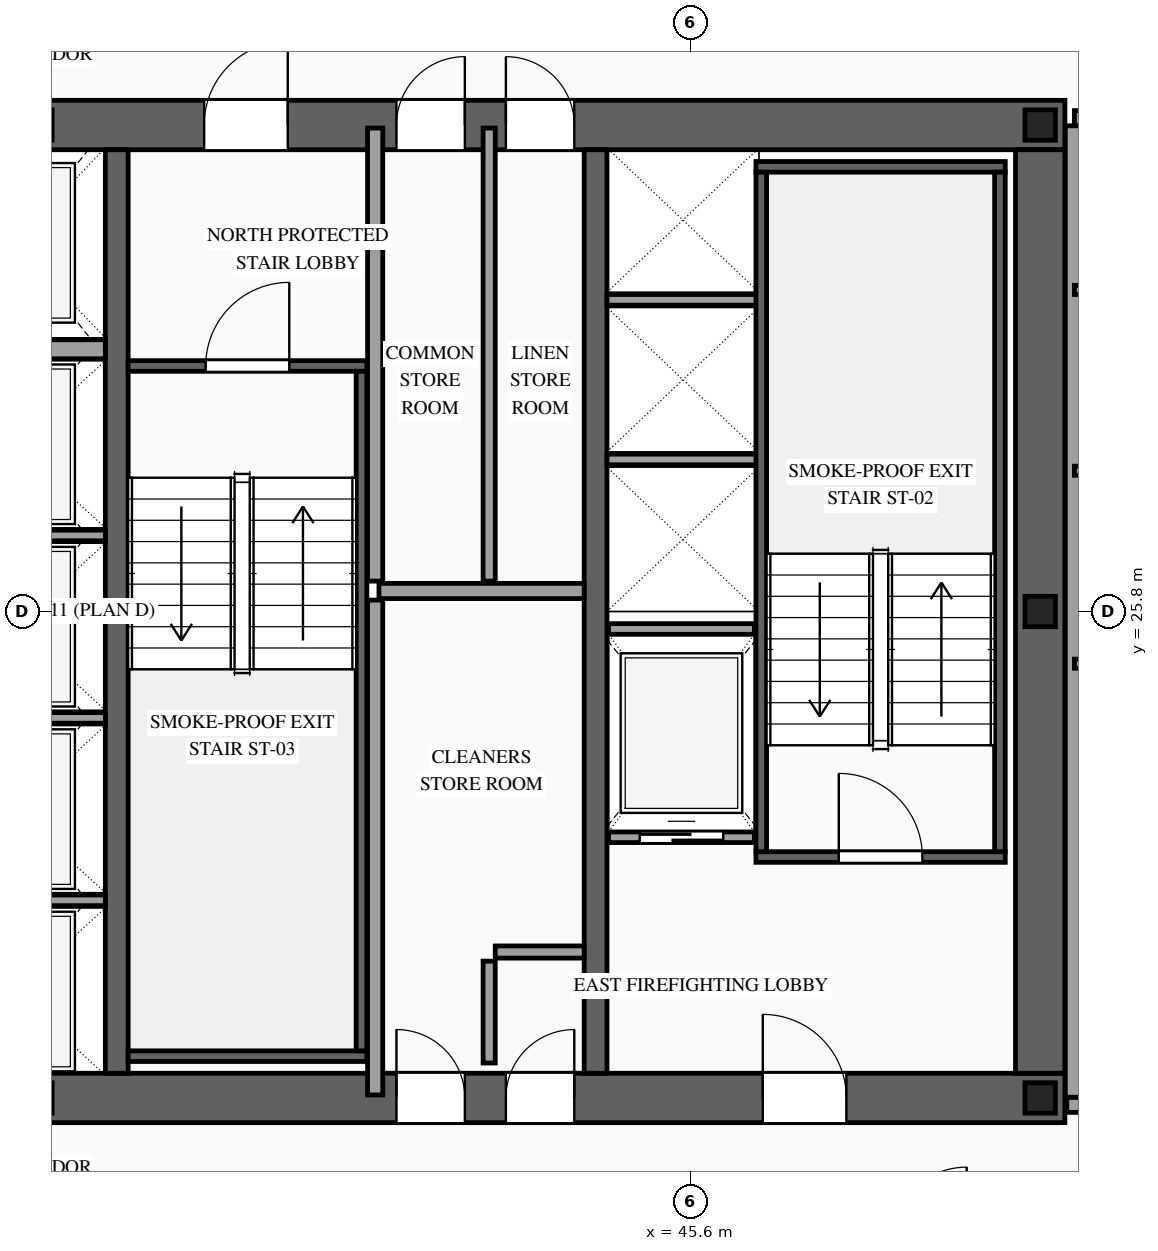
"""IFC4 building model, lengths in metres.
Left out: names, types, materials, properties, quantities, classifications, styles, units other than length and angle.
Written with IfcOpenShell. Run it as: python <this file> out.ifc"""

import sys

from ifc_helpers import new_model, si_unit, direction, frame, frame_2d, origin, origin_2d, place, context, subcontext, project, spatial, rectangle, i_section, extrude, source, transform, mapped, element, fill, save


model = new_model("IFC4")
c1 = context("Model", 3, precision=1e-05, world=origin(), true_north=direction((0.0, 1.0)))
c2 = subcontext(c1, "Body", "Model", "MODEL_VIEW")
j1 = project(units=[si_unit("LENGTHUNIT", "METRE"), si_unit("PLANEANGLEUNIT", "RADIAN")], contexts=[c1])
p1 = place(None, origin())
s1 = spatial("IfcSite", under=j1, at=p1, CompositionType="ELEMENT")
p2 = place(p1, origin())
s2 = spatial("IfcBuilding", under=s1, at=p2, CompositionType="ELEMENT")
p3 = place(p2, frame((0.0, 0.0, 191.5)))
s3 = spatial("IfcBuildingStorey", under=s2, at=p3, CompositionType="ELEMENT", Elevation=191.5)
p4 = place(p3, frame((23.475, 19.4, 0.0), z_axis=(0.0, 0.0, 1.0), x_axis=(1.0, 0.0, 0.0)))
e1 = element("IfcWall", 1, at=p4, inside=s3, PredefinedType="SHEAR", context=c2, shape_type="SweptSolid", body=[
    extrude(rectangle(XDim=27.05, YDim=0.65, at=frame_2d((13.525, 0.0))), origin(), (0.0, 0.0, 1.0), 3.5),
])
p5 = place(p4, frame((1.975, 0.0, 0.0)))
e2 = element("IfcOpeningElement", 2, at=p5, cuts=e1, PredefinedType="OPENING", context=c2, shape_type="SweptSolid", body=[
    extrude(rectangle(XDim=1.1, YDim=2.2, at=frame_2d((0.55, 1.1))), frame((0.0, 0.34, 0.0), z_axis=(0.0, -1.0, 0.0), x_axis=(1.0, 0.0, 0.0)), (0.0, 0.0, 1.0), 0.68),
])
p6 = place(p4, frame((9.875, 0.0, 0.0)))
e3 = element("IfcOpeningElement", 3, at=p6, cuts=e1, PredefinedType="OPENING", context=c2, shape_type="SweptSolid", body=[
    extrude(rectangle(XDim=1.1, YDim=2.2, at=frame_2d((0.55, 1.1))), frame((0.0, 0.34, 0.0), z_axis=(0.0, -1.0, 0.0), x_axis=(1.0, 0.0, 0.0)), (0.0, 0.0, 1.0), 0.68),
])
p7 = place(p4, frame((23.075, 0.0, 0.0)))
e4 = element("IfcOpeningElement", 4, at=p7, cuts=e1, PredefinedType="OPENING", context=c2, shape_type="SweptSolid", body=[
    extrude(rectangle(XDim=1.1, YDim=2.2, at=frame_2d((0.55, 1.1))), frame((0.0, 0.34, 0.0), z_axis=(0.0, -1.0, 0.0), x_axis=(1.0, 0.0, 0.0)), (0.0, 0.0, 1.0), 0.68),
])
p8 = place(p4, frame((19.695, 0.0, 0.0)))
e5 = element("IfcOpeningElement", 5, at=p8, cuts=e1, PredefinedType="OPENING", context=c2, shape_type="SweptSolid", body=[
    extrude(rectangle(XDim=0.9, YDim=2.15, at=frame_2d((0.45, 1.075))), frame((0.0, 0.34, 0.0), z_axis=(0.0, -1.0, 0.0), x_axis=(1.0, 0.0, 0.0)), (0.0, 0.0, 1.0), 0.68),
])
p9 = place(p4, frame((18.255, 0.0, 0.0)))
e6 = element("IfcOpeningElement", 6, at=p9, cuts=e1, PredefinedType="OPENING", context=c2, shape_type="SweptSolid", body=[
    extrude(rectangle(XDim=0.9, YDim=2.15, at=frame_2d((0.45, 1.075))), frame((0.0, 0.34, 0.0), z_axis=(0.0, -1.0, 0.0), x_axis=(1.0, 0.0, 0.0)), (0.0, 0.0, 1.0), 0.68),
])
p10 = place(p3, frame((23.475, 32.2, 0.0), z_axis=(0.0, 0.0, 1.0), x_axis=(1.0, 0.0, 0.0)))
e7 = element("IfcWall", 7, at=p10, inside=s3, PredefinedType="SHEAR", context=c2, shape_type="SweptSolid", body=[
    extrude(rectangle(XDim=27.05, YDim=0.65, at=frame_2d((13.525, 0.0))), origin(), (0.0, 0.0, 1.0), 3.5),
])
p11 = place(p10, frame((4.595, 0.0, 0.0)))
e8 = element("IfcOpeningElement", 8, at=p11, cuts=e7, PredefinedType="OPENING", context=c2, shape_type="SweptSolid", body=[
    extrude(rectangle(XDim=0.9, YDim=2.15, at=frame_2d((0.45, 1.075))), frame((0.0, 0.34, 0.0), z_axis=(0.0, -1.0, 0.0), x_axis=(1.0, 0.0, 0.0)), (0.0, 0.0, 1.0), 0.68),
])
p12 = place(p10, frame((9.875, 0.0, 0.0)))
e9 = element("IfcOpeningElement", 9, at=p12, cuts=e7, PredefinedType="OPENING", context=c2, shape_type="SweptSolid", body=[
    extrude(rectangle(XDim=1.1, YDim=2.2, at=frame_2d((0.55, 1.1))), frame((0.0, 0.34, 0.0), z_axis=(0.0, -1.0, 0.0), x_axis=(1.0, 0.0, 0.0)), (0.0, 0.0, 1.0), 0.68),
])
p13 = place(p10, frame((15.725, 0.0, 0.0)))
e10 = element("IfcOpeningElement", 10, at=p13, cuts=e7, PredefinedType="OPENING", context=c2, shape_type="SweptSolid", body=[
    extrude(rectangle(XDim=1.1, YDim=2.2, at=frame_2d((0.55, 1.1))), frame((0.0, 0.34, 0.0), z_axis=(0.0, -1.0, 0.0), x_axis=(1.0, 0.0, 0.0)), (0.0, 0.0, 1.0), 0.68),
])
p14 = place(p10, frame((18.255, 0.0, 0.0)))
e11 = element("IfcOpeningElement", 11, at=p14, cuts=e7, PredefinedType="OPENING", context=c2, shape_type="SweptSolid", body=[
    extrude(rectangle(XDim=0.9, YDim=2.15, at=frame_2d((0.45, 1.075))), frame((0.0, 0.34, 0.0), z_axis=(0.0, -1.0, 0.0), x_axis=(1.0, 0.0, 0.0)), (0.0, 0.0, 1.0), 0.68),
])
p15 = place(p10, frame((19.695, 0.0, 0.0)))
e12 = element("IfcOpeningElement", 12, at=p15, cuts=e7, PredefinedType="OPENING", context=c2, shape_type="SweptSolid", body=[
    extrude(rectangle(XDim=0.9, YDim=2.15, at=frame_2d((0.45, 1.075))), frame((0.0, 0.34, 0.0), z_axis=(0.0, -1.0, 0.0), x_axis=(1.0, 0.0, 0.0)), (0.0, 0.0, 1.0), 0.68),
])
m1 = source(origin(), c2, "Body", "SweptSolid", [
    extrude(rectangle(XDim=12.15, YDim=0.65, at=frame_2d((6.075, 0.0))), origin(), (0.0, 0.0, 1.0), 3.5),
])
p16 = place(p3, frame((50.2, 19.725, 0.0), z_axis=(0.0, 0.0, 1.0), x_axis=(0.0, 1.0, 0.0)))
e13 = element("IfcWall", 13, at=p16, inside=s3, PredefinedType="SHEAR", context=c2, shape_type="MappedRepresentation", body=[
    mapped(m1, transform((0.0, 0.0, 0.0), scale=1.0)),
])
m2 = source(origin(), c2, "Body", "SweptSolid", [
    extrude(rectangle(XDim=12.15, YDim=0.3, at=frame_2d((6.075, 0.0))), origin(), (0.0, 0.0, 1.0), 3.5),
])
for number, where, z_axis, x_axis in (
    (14, (38.05, 19.725, 0.0), (0.0, 0.0, 1.0), (0.0, 1.0, 0.0)),
    (15, (44.35, 19.725, 0.0), (0.0, 0.0, 1.0), (0.0, 1.0, 0.0)),
):
    element("IfcWall", number, at=place(p3, frame(where, z_axis=z_axis, x_axis=x_axis)), inside=s3, PredefinedType="SOLIDWALL", context=c2, shape_type="MappedRepresentation", body=[
        mapped(m2, transform((0.0, 0.0, 0.0), scale=1.0)),
    ])
m3 = source(origin(), c2, "Body", "SweptSolid", [
    extrude(i_section(OverallWidth=0.4, OverallDepth=0.4, WebThickness=0.013, FlangeThickness=0.021, at=origin_2d()), origin(), (0.0, 0.0, 1.0), 3.5),
])
for number, where, z_axis, x_axis in (
    (16, (50.2, 19.4, 0.0), (0.0, 0.0, 1.0), (1.0, 0.0, 0.0)),
    (17, (50.2, 25.8, 0.0), (0.0, 0.0, 1.0), (1.0, 0.0, 0.0)),
    (18, (50.2, 32.2, 0.0), (0.0, 0.0, 1.0), (1.0, 0.0, 0.0)),
):
    element("IfcColumn", number, at=place(p3, frame(where, z_axis=z_axis, x_axis=x_axis)), inside=s3, PredefinedType="COLUMN", context=c2, shape_type="MappedRepresentation", body=[
        mapped(m3, transform((0.0, 0.0, 0.0), scale=1.0)),
    ])
p17 = place(p3, frame((44.52, 22.83, 0.0), z_axis=(0.0, 0.0, 1.0), x_axis=(1.0, 0.0, 0.0)))
e19 = element("IfcWall", 19, at=p17, inside=s3, PredefinedType="SOLIDWALL", context=c2, shape_type="SweptSolid", body=[
    extrude(rectangle(XDim=1.92, YDim=0.14, at=frame_2d((0.96, 0.0))), origin(), (0.0, 0.0, 1.0), 3.28),
])
p18 = place(p17, frame((0.41, 0.0, 0.0)))
e20 = element("IfcOpeningElement", 20, at=p18, cuts=e19, PredefinedType="OPENING", context=c2, shape_type="SweptSolid", body=[
    extrude(rectangle(XDim=1.1, YDim=2.2, at=frame_2d((0.55, 1.1))), frame((0.0, 0.085, 0.0), z_axis=(0.0, -1.0, 0.0), x_axis=(1.0, 0.0, 0.0)), (0.0, 0.0, 1.0), 0.17),
])
m4 = source(origin(), c2, "Body", "SweptSolid", [
    extrude(rectangle(XDim=1.92, YDim=0.14, at=frame_2d((0.96, 0.0))), origin(), (0.0, 0.0, 1.0), 3.28),
])
p19 = place(p3, frame((44.52, 25.57, 0.0), z_axis=(0.0, 0.0, 1.0), x_axis=(1.0, 0.0, 0.0)))
e21 = element("IfcWall", 21, at=p19, inside=s3, PredefinedType="SOLIDWALL", context=c2, shape_type="MappedRepresentation", body=[
    mapped(m4, transform((0.0, 0.0, 0.0), scale=1.0)),
])
m5 = source(origin(), c2, "Body", "SweptSolid", [
    extrude(rectangle(XDim=2.4, YDim=0.14, at=frame_2d((1.2, 0.0))), origin(), (0.0, 0.0, 1.0), 3.28),
])
for number, where, z_axis, x_axis in (
    (22, (35.5, 22.0, 0.0), (0.0, 0.0, 1.0), (1.0, 0.0, 0.0)),
    (23, (35.5, 24.4, 0.0), (0.0, 0.0, 1.0), (1.0, 0.0, 0.0)),
    (24, (35.5, 26.8, 0.0), (0.0, 0.0, 1.0), (1.0, 0.0, 0.0)),
):
    element("IfcWall", number, at=place(p3, frame(where, z_axis=z_axis, x_axis=x_axis)), inside=s3, PredefinedType="SOLIDWALL", context=c2, shape_type="MappedRepresentation", body=[
        mapped(m5, transform((0.0, 0.0, 0.0), scale=1.0)),
    ])
m6 = source(origin(), c2, "Body", "SweptSolid", [
    extrude(rectangle(XDim=2.4, YDim=0.25, at=frame_2d((1.2, 0.0))), origin(), (0.0, 0.0, 1.0), 3.28),
])
p20 = place(p3, frame((35.5, 29.25, 0.0), z_axis=(0.0, 0.0, 1.0), x_axis=(1.0, 0.0, 0.0)))
e25 = element("IfcWall", 25, at=p20, inside=s3, PredefinedType="SOLIDWALL", context=c2, shape_type="MappedRepresentation", body=[
    mapped(m6, transform((0.0, 0.0, 0.0), scale=1.0)),
])
m7 = source(origin(), c2, "Body", "SweptSolid", [
    extrude(rectangle(XDim=2.0, YDim=0.14, at=frame_2d((1.0, 0.0))), origin(), (0.0, 0.0, 1.0), 3.28),
])
for number, where, z_axis, x_axis in (
    (26, (44.5, 27.8, 0.0), (0.0, 0.0, 1.0), (1.0, 0.0, 0.0)),
    (27, (44.5, 29.9, 0.0), (0.0, 0.0, 1.0), (1.0, 0.0, 0.0)),
):
    element("IfcWall", number, at=place(p3, frame(where, z_axis=z_axis, x_axis=x_axis)), inside=s3, PredefinedType="SOLIDWALL", context=c2, shape_type="MappedRepresentation", body=[
        mapped(m7, transform((0.0, 0.0, 0.0), scale=1.0)),
    ])
p21 = place(p3, frame((46.46, 22.57, 0.0), z_axis=(0.0, 0.0, 1.0), x_axis=(1.0, 0.0, 0.0)))
e28 = element("IfcWall", 28, at=p21, inside=s3, PredefinedType="SOLIDWALL", context=c2, shape_type="SweptSolid", body=[
    extrude(rectangle(XDim=3.28, YDim=0.14, at=frame_2d((1.64, 0.0))), origin(), (0.0, 0.0, 1.0), 3.28),
])
p22 = place(p21, frame((1.09, 0.0, 0.0)))
e29 = element("IfcOpeningElement", 29, at=p22, cuts=e28, PredefinedType="OPENING", context=c2, shape_type="SweptSolid", body=[
    extrude(rectangle(XDim=1.1, YDim=2.2, at=frame_2d((0.55, 1.1))), frame((0.0, 0.085, 0.0), z_axis=(0.0, -1.0, 0.0), x_axis=(1.0, 0.0, 0.0)), (0.0, 0.0, 1.0), 0.17),
])
m8 = source(origin(), c2, "Body", "SweptSolid", [
    extrude(rectangle(XDim=3.28, YDim=0.14, at=frame_2d((1.64, 0.0))), origin(), (0.0, 0.0, 1.0), 3.28),
])
p23 = place(p3, frame((46.46, 31.65, 0.0), z_axis=(0.0, 0.0, 1.0), x_axis=(1.0, 0.0, 0.0)))
e30 = element("IfcWall", 30, at=p23, inside=s3, PredefinedType="SOLIDWALL", context=c2, shape_type="MappedRepresentation", body=[
    mapped(m8, transform((0.0, 0.0, 0.0), scale=1.0)),
])
m9 = source(origin(), c2, "Body", "SweptSolid", [
    extrude(rectangle(XDim=8.94, YDim=0.14, at=frame_2d((4.47, 0.0))), origin(), (0.0, 0.0, 1.0), 3.28),
])
for number, where, z_axis, x_axis in (
    (31, (46.53, 22.64, 0.0), (0.0, 0.0, 1.0), (0.0, 1.0, 0.0)),
    (32, (49.67, 22.64, 0.0), (0.0, 0.0, 1.0), (0.0, 1.0, 0.0)),
):
    element("IfcWall", number, at=place(p3, frame(where, z_axis=z_axis, x_axis=x_axis)), inside=s3, PredefinedType="SOLIDWALL", context=c2, shape_type="MappedRepresentation", body=[
        mapped(m9, transform((0.0, 0.0, 0.0), scale=1.0)),
    ])
p24 = place(p3, frame((38.2, 29.03, 0.0), z_axis=(0.0, 0.0, 1.0), x_axis=(1.0, 0.0, 0.0)))
e33 = element("IfcWall", 33, at=p24, inside=s3, PredefinedType="SOLIDWALL", context=c2, shape_type="SweptSolid", body=[
    extrude(rectangle(XDim=3.14, YDim=0.14, at=frame_2d((1.57, 0.0))), origin(), (0.0, 0.0, 1.0), 3.28),
])
p25 = place(p24, frame((1.02, 0.0, 0.0)))
e34 = element("IfcOpeningElement", 34, at=p25, cuts=e33, PredefinedType="OPENING", context=c2, shape_type="SweptSolid", body=[
    extrude(rectangle(XDim=1.1, YDim=2.2, at=frame_2d((0.55, 1.1))), frame((0.0, 0.085, 0.0), z_axis=(0.0, -1.0, 0.0), x_axis=(1.0, 0.0, 0.0)), (0.0, 0.0, 1.0), 0.17),
])
m10 = source(origin(), c2, "Body", "SweptSolid", [
    extrude(rectangle(XDim=3.14, YDim=0.14, at=frame_2d((1.57, 0.0))), origin(), (0.0, 0.0, 1.0), 3.28),
])
p26 = place(p3, frame((38.2, 19.95, 0.0), z_axis=(0.0, 0.0, 1.0), x_axis=(1.0, 0.0, 0.0)))
e35 = element("IfcWall", 35, at=p26, inside=s3, PredefinedType="SOLIDWALL", context=c2, shape_type="MappedRepresentation", body=[
    mapped(m10, transform((0.0, 0.0, 0.0), scale=1.0)),
])
m11 = source(origin(), c2, "Body", "SweptSolid", [
    extrude(rectangle(XDim=8.94, YDim=0.14, at=frame_2d((4.47, 0.0))), origin(), (0.0, 0.0, 1.0), 3.28),
])
p27 = place(p3, frame((41.27, 20.02, 0.0), z_axis=(0.0, 0.0, 1.0), x_axis=(0.0, 1.0, 0.0)))
e36 = element("IfcWall", 36, at=p27, inside=s3, PredefinedType="SOLIDWALL", context=c2, shape_type="MappedRepresentation", body=[
    mapped(m11, transform((0.0, 0.0, 0.0), scale=1.0)),
])
m12 = source(origin(), c2, "Body", "SweptSolid", [
    extrude(rectangle(XDim=1.34, YDim=0.16, at=frame_2d((0.67, 0.0))), origin(), (0.0, 0.0, 1.0), 3.28),
])
p28 = place(p3, frame((42.95, 19.86, 0.0), z_axis=(0.0, 0.0, 1.0), x_axis=(0.0, 1.0, 0.0)))
e37 = element("IfcWall", 37, at=p28, inside=s3, PredefinedType="PARTITIONING", context=c2, shape_type="MappedRepresentation", body=[
    mapped(m12, transform((0.0, 0.0, 0.0), scale=1.0)),
])
m13 = source(origin(), c2, "Body", "SweptSolid", [
    extrude(rectangle(XDim=1.17, YDim=0.16, at=frame_2d((0.585, 0.0))), origin(), (0.0, 0.0, 1.0), 3.28),
])
p29 = place(p3, frame((43.03, 21.32, 0.0), z_axis=(0.0, 0.0, 1.0), x_axis=(1.0, 0.0, 0.0)))
e38 = element("IfcWall", 38, at=p29, inside=s3, PredefinedType="PARTITIONING", context=c2, shape_type="MappedRepresentation", body=[
    mapped(m13, transform((0.0, 0.0, 0.0), scale=1.0)),
])
m14 = source(origin(), c2, "Body", "SweptSolid", [
    extrude(rectangle(XDim=6.51, YDim=0.2, at=frame_2d((3.255, 0.0))), origin(), (0.0, 0.0, 1.0), 3.28),
])
p30 = place(p3, frame((41.45, 19.44, 0.0), z_axis=(0.0, 0.0, 1.0), x_axis=(0.0, 1.0, 0.0)))
e39 = element("IfcWall", 39, at=p30, inside=s3, PredefinedType="PARTITIONING", context=c2, shape_type="MappedRepresentation", body=[
    mapped(m14, transform((0.0, 0.0, 0.0), scale=1.0)),
])
m15 = source(origin(), c2, "Body", "SweptSolid", [
    extrude(rectangle(XDim=2.7, YDim=0.2, at=frame_2d((1.35, 0.0))), origin(), (0.0, 0.0, 1.0), 3.28),
])
p31 = place(p3, frame((41.5, 26.07, 0.0), z_axis=(0.0, 0.0, 1.0), x_axis=(1.0, 0.0, 0.0)))
e40 = element("IfcWall", 40, at=p31, inside=s3, PredefinedType="PARTITIONING", context=c2, shape_type="MappedRepresentation", body=[
    mapped(m15, transform((0.0, 0.0, 0.0), scale=1.0)),
])
m16 = source(origin(), c2, "Body", "SweptSolid", [
    extrude(rectangle(XDim=5.96, YDim=0.2, at=frame_2d((2.98, 0.0))), origin(), (0.0, 0.0, 1.0), 3.28),
])
p32 = place(p3, frame((41.45, 26.2, 0.0), z_axis=(0.0, 0.0, 1.0), x_axis=(0.0, 1.0, 0.0)))
e41 = element("IfcWall", 41, at=p32, inside=s3, PredefinedType="PARTITIONING", context=c2, shape_type="MappedRepresentation", body=[
    mapped(m16, transform((0.0, 0.0, 0.0), scale=1.0)),
])
m17 = source(origin(), c2, "Body", "SweptSolid", [
    extrude(rectangle(XDim=5.96, YDim=0.16, at=frame_2d((2.98, 0.0))), origin(), (0.0, 0.0, 1.0), 3.28),
])
p33 = place(p3, frame((42.95, 26.2, 0.0), z_axis=(0.0, 0.0, 1.0), x_axis=(0.0, 1.0, 0.0)))
e42 = element("IfcWall", 42, at=p33, inside=s3, PredefinedType="PARTITIONING", context=c2, shape_type="MappedRepresentation", body=[
    mapped(m17, transform((0.0, 0.0, 0.0), scale=1.0)),
])
p34 = place(p3, frame((50.65, 32.29, 0.0), z_axis=(0.0, 0.0, 1.0), x_axis=(1.0, 0.0, 0.0)))
e43 = element("IfcWall", 43, at=p34, inside=s3, PredefinedType="PARTITIONING", context=c2, shape_type="SweptSolid", body=[
    extrude(rectangle(XDim=8.3, YDim=0.2, at=frame_2d((4.15, 0.0))), origin(), (0.0, 0.0, 1.0), 2.775),
])
p35 = place(p34, frame((3.585, 0.0, 0.0)))
e44 = element("IfcOpeningElement", 44, at=p35, cuts=e43, PredefinedType="OPENING", context=c2, shape_type="SweptSolid", body=[
    extrude(rectangle(XDim=1.0, YDim=2.2, at=frame_2d((0.5, 1.1))), frame((0.0, 0.115, 0.0), z_axis=(0.0, -1.0, 0.0), x_axis=(1.0, 0.0, 0.0)), (0.0, 0.0, 1.0), 0.23),
])
m18 = source(origin(), c2, "Body", "SweptSolid", [
    extrude(rectangle(XDim=8.4, YDim=0.2, at=frame_2d((4.2, 0.0))), origin(), (0.0, 0.0, 1.0), 2.775),
])
p36 = place(p3, frame((50.55, 19.31, 0.0), z_axis=(0.0, 0.0, 1.0), x_axis=(1.0, 0.0, 0.0)))
e45 = element("IfcWall", 45, at=p36, inside=s3, PredefinedType="PARTITIONING", context=c2, shape_type="MappedRepresentation", body=[
    mapped(m18, transform((0.0, 0.0, 0.0), scale=1.0)),
])
m19 = source(origin(), c2, "Body", "SweptSolid", [
    extrude(rectangle(XDim=12.78, YDim=0.2, at=frame_2d((6.39, 0.0))), origin(), (0.0, 0.0, 1.0), 3.28),
])
p37 = place(p3, frame((50.63, 19.41, 0.0), z_axis=(0.0, 0.0, 1.0), x_axis=(0.0, 1.0, 0.0)))
e46 = element("IfcWall", 46, at=p37, inside=s3, PredefinedType="PARTITIONING", context=c2, shape_type="MappedRepresentation", body=[
    mapped(m19, transform((0.0, 0.0, 0.0), scale=1.0)),
])
m20 = source(origin(), c2, "Body", "SweptSolid", [
    extrude(rectangle(XDim=2.75, YDim=0.12, at=frame_2d((1.375, 0.0))), origin(), (0.0, 0.0, 1.0), 3.28),
])
for number, where, z_axis, x_axis in (
    (47, (50.65, 25.113, 0.0), (0.0, 0.0, 1.0), (1.0, 0.0, 0.0)),
    (48, (50.65, 27.652, 0.0), (0.0, 0.0, 1.0), (1.0, 0.0, 0.0)),
    (49, (50.65, 30.031, 0.0), (0.0, 0.0, 1.0), (1.0, 0.0, 0.0)),
):
    element("IfcWall", number, at=place(p3, frame(where, z_axis=z_axis, x_axis=x_axis)), inside=s3, PredefinedType="PARTITIONING", context=c2, shape_type="MappedRepresentation", body=[
        mapped(m20, transform((0.0, 0.0, 0.0), scale=1.0)),
    ])
m21 = source(origin(), c2, "Body", "SweptSolid", [
    extrude(rectangle(XDim=1.1, YDim=2.2, at=frame_2d((0.55, 1.1))), frame((0.0, 0.025, 0.0), z_axis=(0.0, -1.0, 0.0), x_axis=(1.0, 0.0, 0.0)), (0.0, 0.0, 1.0), 0.05),
])
p38 = place(p18, origin())
e50 = element("IfcDoor", 50, at=p38, inside=s3, OperationType="SLIDING_TO_RIGHT", PredefinedType="DOOR", context=c2, shape_type="MappedRepresentation", body=[
    mapped(m21, transform((0.0, 0.0, 0.0), scale=1.0)),
])
fill(e20, e50)
m22 = source(origin(), c2, "Body", "SweptSolid", [
    extrude(rectangle(XDim=1.1, YDim=2.2, at=frame_2d((0.55, 1.1))), frame((0.0, 0.025, 0.0), z_axis=(0.0, -1.0, 0.0), x_axis=(1.0, 0.0, 0.0)), (0.0, 0.0, 1.0), 0.05),
])
p39 = place(p22, origin())
e51 = element("IfcDoor", 51, at=p39, inside=s3, OperationType="SINGLE_SWING_LEFT", PredefinedType="DOOR", context=c2, shape_type="MappedRepresentation", body=[
    mapped(m22, transform((0.0, 0.0, 0.0), scale=1.0)),
])
fill(e29, e51)
p40 = place(p25, origin())
e52 = element("IfcDoor", 52, at=p40, inside=s3, OperationType="SINGLE_SWING_RIGHT", PredefinedType="DOOR", context=c2, shape_type="MappedRepresentation", body=[
    mapped(m22, transform((0.0, 0.0, 0.0), scale=1.0)),
])
fill(e34, e52)
p41 = place(p7, origin())
e53 = element("IfcDoor", 53, at=p41, inside=s3, OperationType="SINGLE_SWING_LEFT", PredefinedType="DOOR", context=c2, shape_type="MappedRepresentation", body=[
    mapped(m22, transform((0.0, 0.0, 0.0), scale=1.0)),
])
fill(e4, e53)
p42 = place(p13, origin())
e54 = element("IfcDoor", 54, at=p42, inside=s3, OperationType="SINGLE_SWING_RIGHT", PredefinedType="DOOR", context=c2, shape_type="MappedRepresentation", body=[
    mapped(m22, transform((0.0, 0.0, 0.0), scale=1.0)),
])
fill(e10, e54)
m23 = source(origin(), c2, "Body", "SweptSolid", [
    extrude(rectangle(XDim=0.9, YDim=2.15, at=frame_2d((0.45, 1.075))), frame((0.0, 0.025, 0.0), z_axis=(0.0, -1.0, 0.0), x_axis=(1.0, 0.0, 0.0)), (0.0, 0.0, 1.0), 0.05),
])
p43 = place(p8, origin())
e55 = element("IfcDoor", 55, at=p43, inside=s3, OperationType="SINGLE_SWING_RIGHT", PredefinedType="DOOR", context=c2, shape_type="MappedRepresentation", body=[
    mapped(m23, transform((0.0, 0.0, 0.0), scale=1.0)),
])
fill(e5, e55)
p44 = place(p9, origin())
e56 = element("IfcDoor", 56, at=p44, inside=s3, OperationType="SINGLE_SWING_LEFT", PredefinedType="DOOR", context=c2, shape_type="MappedRepresentation", body=[
    mapped(m23, transform((0.0, 0.0, 0.0), scale=1.0)),
])
fill(e6, e56)
p45 = place(p14, origin())
e57 = element("IfcDoor", 57, at=p45, inside=s3, OperationType="SINGLE_SWING_RIGHT", PredefinedType="DOOR", context=c2, shape_type="MappedRepresentation", body=[
    mapped(m23, transform((0.0, 0.0, 0.0), scale=1.0)),
])
fill(e11, e57)
p46 = place(p15, origin())
e58 = element("IfcDoor", 58, at=p46, inside=s3, OperationType="SINGLE_SWING_LEFT", PredefinedType="DOOR", context=c2, shape_type="MappedRepresentation", body=[
    mapped(m23, transform((0.0, 0.0, 0.0), scale=1.0)),
])
fill(e12, e58)
save(model, sys.argv[1])
